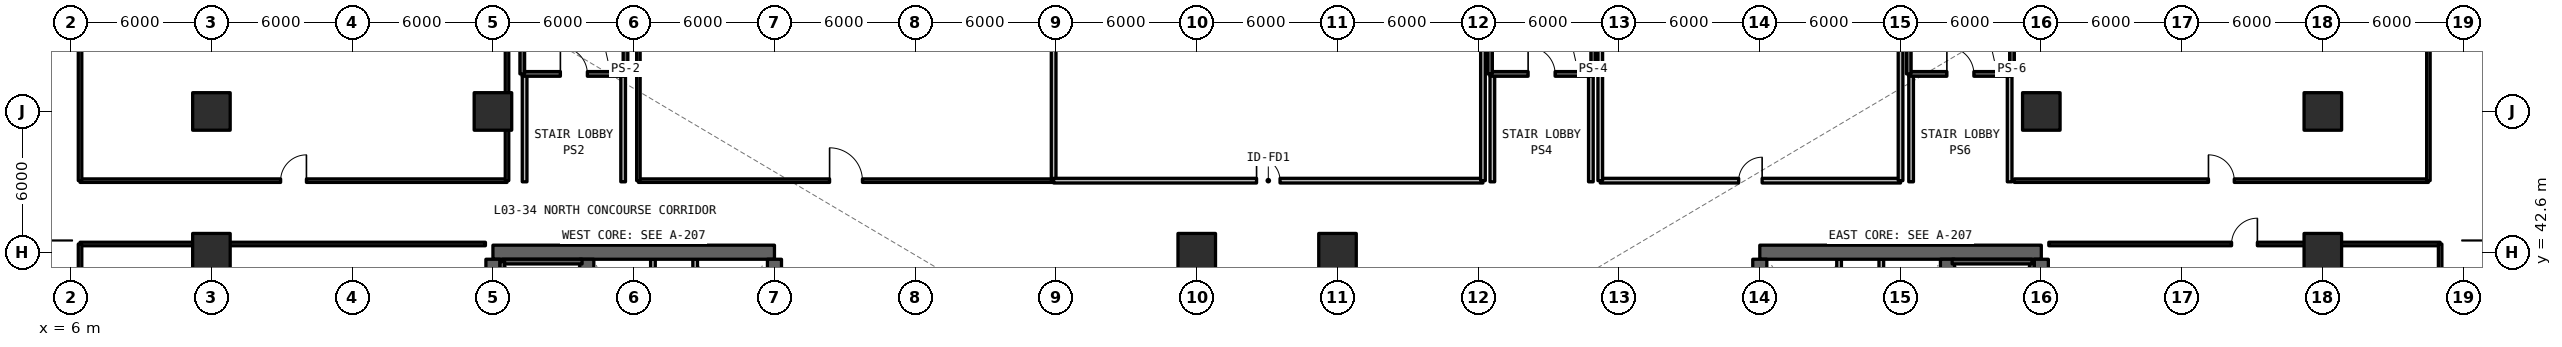
"""IFC4 building model, lengths in metres.
Left out: names, types, materials, properties, quantities, classifications, styles, units other than length and angle.
Written with IfcOpenShell. Run it as: python <this file> out.ifc"""

import sys

from ifc_helpers import new_model, si_unit, direction, frame, frame_2d, origin, origin_2d, place, context, subcontext, project, spatial, rectangle, extrude, element, fill, save


model = new_model("IFC4")
c1 = context("Model", 3, precision=1e-05, world=origin(), true_north=direction((0.0, 1.0)))
c2 = subcontext(c1, "Body", "Model", "MODEL_VIEW")
j1 = project(units=[si_unit("LENGTHUNIT", "METRE"), si_unit("PLANEANGLEUNIT", "RADIAN")], contexts=[c1])
p1 = place(None, origin())
s1 = spatial("IfcSite", under=j1, at=p1, CompositionType="ELEMENT")
p2 = place(p1, origin())
s2 = spatial("IfcBuilding", under=s1, at=p2, CompositionType="ELEMENT")
p3 = place(p2, frame((0.0, 0.0, 9.9)))
s3 = spatial("IfcBuildingStorey", under=s2, at=p3, CompositionType="ELEMENT", Elevation=9.9)
p4 = place(p3, frame((36.0, 42.6, 0.0), z_axis=(0.0, 0.0, 1.0), x_axis=(-1.0, 0.0, 0.0)))
e1 = element("IfcWall", 1, at=p4, inside=s3, PredefinedType="SHEAR", context=c2, shape_type="SweptSolid", body=[
    extrude(rectangle(XDim=12.0, YDim=0.6, at=frame_2d((6.0, 0.0))), origin(), (0.0, 0.0, 1.0), 4.95),
])
p5 = place(p3, frame((24.0, 24.9, 0.0), z_axis=(0.0, 0.0, 1.0), x_axis=(0.0, 1.0, 0.0)))
e2 = element("IfcWall", 2, at=p5, inside=s3, PredefinedType="SHEAR", context=c2, shape_type="SweptSolid", body=[
    extrude(rectangle(XDim=17.4, YDim=0.6, at=frame_2d((8.7, 0.0))), origin(), (0.0, 0.0, 1.0), 4.95),
])
p6 = place(p3, frame((36.0, 36.8, 0.0), z_axis=(0.0, 0.0, 1.0), x_axis=(0.0, 1.0, 0.0)))
e3 = element("IfcWall", 3, at=p6, inside=s3, PredefinedType="SHEAR", context=c2, shape_type="SweptSolid", body=[
    extrude(rectangle(XDim=5.5, YDim=0.6, at=frame_2d((2.75, 0.0))), origin(), (0.0, 0.0, 1.0), 4.95),
])
p7 = place(p3, frame((28.0, 24.9, 0.0), z_axis=(0.0, 0.0, 1.0), x_axis=(0.0, 1.0, 0.0)))
e4 = element("IfcWall", 4, at=p7, inside=s3, PredefinedType="SHEAR", context=c2, shape_type="SweptSolid", body=[
    extrude(rectangle(XDim=17.4, YDim=0.6, at=frame_2d((8.7, 0.0))), origin(), (0.0, 0.0, 1.0), 4.95),
])
p8 = place(p7, frame((0.35, 0.0, 0.0)))
e5 = element("IfcOpeningElement", 5, at=p8, cuts=e4, PredefinedType="OPENING", context=c2, shape_type="SweptSolid", body=[
    extrude(rectangle(XDim=1.15, YDim=2.15, at=frame_2d((0.575, 1.075))), frame((0.0, 0.31, 0.0), z_axis=(0.0, -1.0, 0.0), x_axis=(1.0, 0.0, 0.0)), (0.0, 0.0, 1.0), 0.62),
])
p9 = place(p7, frame((9.55, 0.0, 0.0)))
e6 = element("IfcOpeningElement", 6, at=p9, cuts=e4, PredefinedType="OPENING", context=c2, shape_type="SweptSolid", body=[
    extrude(rectangle(XDim=1.15, YDim=2.15, at=frame_2d((0.575, 1.075))), frame((0.0, 0.31, 0.0), z_axis=(0.0, -1.0, 0.0), x_axis=(1.0, 0.0, 0.0)), (0.0, 0.0, 1.0), 0.62),
])
p10 = place(p3, frame((90.0, 42.6, 0.0), z_axis=(0.0, 0.0, 1.0), x_axis=(-1.0, 0.0, 0.0)))
e7 = element("IfcWall", 7, at=p10, inside=s3, PredefinedType="SHEAR", context=c2, shape_type="SweptSolid", body=[
    extrude(rectangle(XDim=12.0, YDim=0.6, at=frame_2d((6.0, 0.0))), origin(), (0.0, 0.0, 1.0), 4.95),
])
p11 = place(p3, frame((90.0, 24.9, 0.0), z_axis=(0.0, 0.0, 1.0), x_axis=(0.0, 1.0, 0.0)))
e8 = element("IfcWall", 8, at=p11, inside=s3, PredefinedType="SHEAR", context=c2, shape_type="SweptSolid", body=[
    extrude(rectangle(XDim=17.4, YDim=0.6, at=frame_2d((8.7, 0.0))), origin(), (0.0, 0.0, 1.0), 4.95),
])
p12 = place(p3, frame((78.0, 36.8, 0.0), z_axis=(0.0, 0.0, 1.0), x_axis=(0.0, 1.0, 0.0)))
e9 = element("IfcWall", 9, at=p12, inside=s3, PredefinedType="SHEAR", context=c2, shape_type="SweptSolid", body=[
    extrude(rectangle(XDim=5.5, YDim=0.6, at=frame_2d((2.75, 0.0))), origin(), (0.0, 0.0, 1.0), 4.95),
])
p13 = place(p3, frame((86.0, 24.9, 0.0), z_axis=(0.0, 0.0, 1.0), x_axis=(0.0, 1.0, 0.0)))
e10 = element("IfcWall", 10, at=p13, inside=s3, PredefinedType="SHEAR", context=c2, shape_type="SweptSolid", body=[
    extrude(rectangle(XDim=17.4, YDim=0.6, at=frame_2d((8.7, 0.0))), origin(), (0.0, 0.0, 1.0), 4.95),
])
p14 = place(p13, frame((0.35, 0.0, 0.0)))
e11 = element("IfcOpeningElement", 11, at=p14, cuts=e10, PredefinedType="OPENING", context=c2, shape_type="SweptSolid", body=[
    extrude(rectangle(XDim=1.15, YDim=2.15, at=frame_2d((0.575, 1.075))), frame((0.0, 0.31, 0.0), z_axis=(0.0, -1.0, 0.0), x_axis=(1.0, 0.0, 0.0)), (0.0, 0.0, 1.0), 0.62),
])
p15 = place(p13, frame((9.55, 0.0, 0.0)))
e12 = element("IfcOpeningElement", 12, at=p15, cuts=e10, PredefinedType="OPENING", context=c2, shape_type="SweptSolid", body=[
    extrude(rectangle(XDim=1.15, YDim=2.15, at=frame_2d((0.575, 1.075))), frame((0.0, 0.31, 0.0), z_axis=(0.0, -1.0, 0.0), x_axis=(1.0, 0.0, 0.0)), (0.0, 0.0, 1.0), 0.62),
])
for number, where, z_axis, x_axis in (
    (13, (12.0, 42.6, 0.0), (0.0, 0.0, 1.0), (1.0, 0.0, 0.0)),
    (14, (54.0, 42.6, 0.0), (0.0, 0.0, 1.0), (1.0, 0.0, 0.0)),
    (15, (60.0, 42.6, 0.0), (0.0, 0.0, 1.0), (1.0, 0.0, 0.0)),
    (16, (102.0, 42.6, 0.0), (0.0, 0.0, 1.0), (1.0, 0.0, 0.0)),
    (17, (12.0, 48.6, 0.0), (0.0, 0.0, 1.0), (1.0, 0.0, 0.0)),
    (18, (24.0, 48.6, 0.0), (0.0, 0.0, 1.0), (1.0, 0.0, 0.0)),
    (19, (90.0, 48.6, 0.0), (0.0, 0.0, 1.0), (1.0, 0.0, 0.0)),
    (20, (102.0, 48.6, 0.0), (0.0, 0.0, 1.0), (1.0, 0.0, 0.0)),
):
    element("IfcColumn", number, at=place(p3, frame(where, z_axis=z_axis, x_axis=x_axis)), inside=s3, PredefinedType="COLUMN", context=c2, shape_type="SweptSolid", body=[
        extrude(rectangle(XDim=1.6, YDim=1.6, at=origin_2d()), origin(), (0.0, 0.0, 1.0), 4.95),
    ])
for number, where, z_axis, x_axis in (
    (21, (30.82, 36.88, 0.0), (0.0, 0.0, 1.0), (0.0, 1.0, 0.0)),
    (22, (32.62, 36.88, 0.0), (0.0, 0.0, 1.0), (0.0, 1.0, 0.0)),
    (23, (83.18, 36.88, 0.0), (0.0, 0.0, 1.0), (0.0, 1.0, 0.0)),
    (24, (81.38, 36.88, 0.0), (0.0, 0.0, 1.0), (0.0, 1.0, 0.0)),
):
    element("IfcWall", number, at=place(p3, frame(where, z_axis=z_axis, x_axis=x_axis)), inside=s3, PredefinedType="SOLIDWALL", context=c2, shape_type="SweptSolid", body=[
        extrude(rectangle(XDim=5.42, YDim=0.2, at=frame_2d((2.71, 0.0))), origin(), (0.0, 0.0, 1.0), 3.89),
    ])
for number, where, z_axis, x_axis in (
    (25, (25.35, 45.6, 0.0), (0.0, 0.0, 1.0), (0.0, 1.0, 0.0)),
    (26, (29.55, 45.6, 0.0), (0.0, 0.0, 1.0), (0.0, 1.0, 0.0)),
    (27, (66.6, 45.6, 0.0), (0.0, 0.0, 1.0), (0.0, 1.0, 0.0)),
    (28, (70.8, 45.6, 0.0), (0.0, 0.0, 1.0), (0.0, 1.0, 0.0)),
    (29, (84.45, 45.6, 0.0), (0.0, 0.0, 1.0), (0.0, 1.0, 0.0)),
    (30, (88.65, 45.6, 0.0), (0.0, 0.0, 1.0), (0.0, 1.0, 0.0)),
):
    element("IfcWall", number, at=place(p3, frame(where, z_axis=z_axis, x_axis=x_axis)), inside=s3, PredefinedType="SOLIDWALL", context=c2, shape_type="SweptSolid", body=[
        extrude(rectangle(XDim=4.6, YDim=0.2, at=frame_2d((2.3, 0.0))), origin(), (0.0, 0.0, 1.0), 3.89),
    ])
p16 = place(p3, frame((30.2, 45.65, 0.0), z_axis=(0.0, 0.0, 1.0), x_axis=(1.0, 0.0, 0.0)))
e31 = element("IfcWall", 31, at=p16, inside=s3, PredefinedType="SOLIDWALL", context=c2, shape_type="SweptSolid", body=[
    extrude(rectangle(XDim=17.7, YDim=0.15, at=frame_2d((8.85, 0.0))), origin(), (0.0, 0.0, 1.0), 3.89),
])
p17 = place(p16, frame((8.15, 0.0, 0.0)))
e32 = element("IfcOpeningElement", 32, at=p17, cuts=e31, PredefinedType="OPENING", context=c2, shape_type="SweptSolid", body=[
    extrude(rectangle(XDim=1.4, YDim=2.15, at=frame_2d((0.7, 1.075))), frame((0.0, 0.085, 0.0), z_axis=(0.0, -1.0, 0.0), x_axis=(1.0, 0.0, 0.0)), (0.0, 0.0, 1.0), 0.17),
])
p18 = place(p3, frame((30.2, 45.65, 0.0), z_axis=(0.0, 0.0, 1.0), x_axis=(0.0, 1.0, 0.0)))
e33 = element("IfcWall", 33, at=p18, inside=s3, PredefinedType="SOLIDWALL", context=c2, shape_type="SweptSolid", body=[
    extrude(rectangle(XDim=19.25, YDim=0.15, at=frame_2d((9.625, 0.0))), origin(), (0.0, 0.0, 1.0), 3.89),
])
p19 = place(p3, frame((47.9, 45.65, 0.0), z_axis=(0.0, 0.0, 1.0), x_axis=(0.0, 1.0, 0.0)))
e34 = element("IfcWall", 34, at=p19, inside=s3, PredefinedType="SOLIDWALL", context=c2, shape_type="SweptSolid", body=[
    extrude(rectangle(XDim=19.25, YDim=0.2, at=frame_2d((9.625, 0.0))), origin(), (0.0, 0.0, 1.0), 3.89),
])
p20 = place(p3, frame((47.9, 45.65, 0.0), z_axis=(0.0, 0.0, 1.0), x_axis=(1.0, 0.0, 0.0)))
e35 = element("IfcWall", 35, at=p20, inside=s3, PredefinedType="SOLIDWALL", context=c2, shape_type="SweptSolid", body=[
    extrude(rectangle(XDim=18.3, YDim=0.2, at=frame_2d((9.15, 0.0))), origin(), (0.0, 0.0, 1.0), 3.89),
])
p21 = place(p20, frame((8.65, 0.0, 0.0)))
e36 = element("IfcOpeningElement", 36, at=p21, cuts=e35, PredefinedType="OPENING", context=c2, shape_type="SweptSolid", body=[
    extrude(rectangle(XDim=1.0, YDim=2.15, at=frame_2d((0.5, 1.075))), frame((0.0, 0.11, 0.0), z_axis=(0.0, -1.0, 0.0), x_axis=(1.0, 0.0, 0.0)), (0.0, 0.0, 1.0), 0.22),
])
p22 = place(p3, frame((66.2, 45.65, 0.0), z_axis=(0.0, 0.0, 1.0), x_axis=(0.0, 1.0, 0.0)))
e37 = element("IfcWall", 37, at=p22, inside=s3, PredefinedType="SOLIDWALL", context=c2, shape_type="SweptSolid", body=[
    extrude(rectangle(XDim=19.25, YDim=0.2, at=frame_2d((9.625, 0.0))), origin(), (0.0, 0.0, 1.0), 3.89),
])
p23 = place(p3, frame((71.2, 45.65, 0.0), z_axis=(0.0, 0.0, 1.0), x_axis=(1.0, 0.0, 0.0)))
e38 = element("IfcWall", 38, at=p23, inside=s3, PredefinedType="SOLIDWALL", context=c2, shape_type="SweptSolid", body=[
    extrude(rectangle(XDim=12.8, YDim=0.2, at=frame_2d((6.4, 0.0))), origin(), (0.0, 0.0, 1.0), 3.89),
])
p24 = place(p23, frame((5.9, 0.0, 0.0)))
e39 = element("IfcOpeningElement", 39, at=p24, cuts=e38, PredefinedType="OPENING", context=c2, shape_type="SweptSolid", body=[
    extrude(rectangle(XDim=1.0, YDim=2.15, at=frame_2d((0.5, 1.075))), frame((0.0, 0.11, 0.0), z_axis=(0.0, -1.0, 0.0), x_axis=(1.0, 0.0, 0.0)), (0.0, 0.0, 1.0), 0.22),
])
for number, where, z_axis, x_axis in (
    (40, (71.2, 45.65, 0.0), (0.0, 0.0, 1.0), (0.0, 1.0, 0.0)),
    (41, (84.0, 45.65, 0.0), (0.0, 0.0, 1.0), (0.0, 1.0, 0.0)),
):
    element("IfcWall", number, at=place(p3, frame(where, z_axis=z_axis, x_axis=x_axis)), inside=s3, PredefinedType="SOLIDWALL", context=c2, shape_type="SweptSolid", body=[
        extrude(rectangle(XDim=19.25, YDim=0.2, at=frame_2d((9.625, 0.0))), origin(), (0.0, 0.0, 1.0), 3.89),
    ])
p25 = place(p3, frame((90.32, 42.95, 0.0), z_axis=(0.0, 0.0, 1.0), x_axis=(1.0, 0.0, 0.0)))
e42 = element("IfcWall", 42, at=p25, inside=s3, PredefinedType="SOLIDWALL", context=c2, shape_type="SweptSolid", body=[
    extrude(rectangle(XDim=16.68, YDim=0.15, at=frame_2d((8.34, 0.0))), origin(), (0.0, 0.0, 1.0), 3.89),
])
p26 = place(p25, frame((7.79, 0.0, 0.0)))
e43 = element("IfcOpeningElement", 43, at=p26, cuts=e42, PredefinedType="OPENING", context=c2, shape_type="SweptSolid", body=[
    extrude(rectangle(XDim=1.1, YDim=2.15, at=frame_2d((0.55, 1.075))), frame((0.0, 0.085, 0.0), z_axis=(0.0, -1.0, 0.0), x_axis=(1.0, 0.0, 0.0)), (0.0, 0.0, 1.0), 0.17),
])
p27 = place(p3, frame((107.0, 33.4, 0.0), z_axis=(0.0, 0.0, 1.0), x_axis=(0.0, 1.0, 0.0)))
e44 = element("IfcWall", 44, at=p27, inside=s3, PredefinedType="SOLIDWALL", context=c2, shape_type="SweptSolid", body=[
    extrude(rectangle(XDim=9.55, YDim=0.15, at=frame_2d((4.775, 0.0))), origin(), (0.0, 0.0, 1.0), 3.89),
])
p28 = place(p3, frame((6.4, 42.95, 0.0), z_axis=(0.0, 0.0, 1.0), x_axis=(1.0, 0.0, 0.0)))
e45 = element("IfcWall", 45, at=p28, inside=s3, PredefinedType="SOLIDWALL", context=c2, shape_type="SweptSolid", body=[
    extrude(rectangle(XDim=17.28, YDim=0.15, at=frame_2d((8.64, 0.0))), origin(), (0.0, 0.0, 1.0), 3.89),
])
p29 = place(p3, frame((6.4, 24.25, 0.0), z_axis=(0.0, 0.0, 1.0), x_axis=(0.0, 1.0, 0.0)))
e46 = element("IfcWall", 46, at=p29, inside=s3, PredefinedType="SOLIDWALL", context=c2, shape_type="SweptSolid", body=[
    extrude(rectangle(XDim=18.7, YDim=0.15, at=frame_2d((9.35, 0.0))), origin(), (0.0, 0.0, 1.0), 3.89),
])
p30 = place(p3, frame((6.4, 45.65, 0.0), z_axis=(0.0, 0.0, 1.0), x_axis=(1.0, 0.0, 0.0)))
e47 = element("IfcWall", 47, at=p30, inside=s3, PredefinedType="SOLIDWALL", context=c2, shape_type="SweptSolid", body=[
    extrude(rectangle(XDim=18.2, YDim=0.15, at=frame_2d((9.1, 0.0))), origin(), (0.0, 0.0, 1.0), 3.89),
])
p31 = place(p30, frame((8.55, 0.0, 0.0)))
e48 = element("IfcOpeningElement", 48, at=p31, cuts=e47, PredefinedType="OPENING", context=c2, shape_type="SweptSolid", body=[
    extrude(rectangle(XDim=1.1, YDim=2.15, at=frame_2d((0.55, 1.075))), frame((0.0, 0.085, 0.0), z_axis=(0.0, -1.0, 0.0), x_axis=(1.0, 0.0, 0.0)), (0.0, 0.0, 1.0), 0.17),
])
for number, where, z_axis, x_axis in (
    (49, (6.4, 45.65, 0.0), (0.0, 0.0, 1.0), (0.0, 1.0, 0.0)),
    (50, (24.6, 45.65, 0.0), (0.0, 0.0, 1.0), (0.0, 1.0, 0.0)),
):
    element("IfcWall", number, at=place(p3, frame(where, z_axis=z_axis, x_axis=x_axis)), inside=s3, PredefinedType="SOLIDWALL", context=c2, shape_type="SweptSolid", body=[
        extrude(rectangle(XDim=19.25, YDim=0.15, at=frame_2d((9.625, 0.0))), origin(), (0.0, 0.0, 1.0), 3.89),
    ])
p32 = place(p3, frame((88.85, 45.65, 0.0), z_axis=(0.0, 0.0, 1.0), x_axis=(1.0, 0.0, 0.0)))
e51 = element("IfcWall", 51, at=p32, inside=s3, PredefinedType="SOLIDWALL", context=c2, shape_type="SweptSolid", body=[
    extrude(rectangle(XDim=17.65, YDim=0.15, at=frame_2d((8.825, 0.0))), origin(), (0.0, 0.0, 1.0), 3.89),
])
p33 = place(p32, frame((8.275, 0.0, 0.0)))
e52 = element("IfcOpeningElement", 52, at=p33, cuts=e51, PredefinedType="OPENING", context=c2, shape_type="SweptSolid", body=[
    extrude(rectangle(XDim=1.1, YDim=2.15, at=frame_2d((0.55, 1.075))), frame((0.0, 0.085, 0.0), z_axis=(0.0, -1.0, 0.0), x_axis=(1.0, 0.0, 0.0)), (0.0, 0.0, 1.0), 0.17),
])
p34 = place(p3, frame((106.5, 45.65, 0.0), z_axis=(0.0, 0.0, 1.0), x_axis=(0.0, 1.0, 0.0)))
e53 = element("IfcWall", 53, at=p34, inside=s3, PredefinedType="SOLIDWALL", context=c2, shape_type="SweptSolid", body=[
    extrude(rectangle(XDim=19.25, YDim=0.15, at=frame_2d((9.625, 0.0))), origin(), (0.0, 0.0, 1.0), 3.89),
])
p35 = place(p3, frame((27.8, 42.2, 0.0), z_axis=(0.0, 0.0, 1.0), x_axis=(-1.0, 0.0, 0.0)))
e54 = element("IfcWall", 54, at=p35, inside=s3, PredefinedType="SOLIDWALL", context=c2, shape_type="SweptSolid", body=[
    extrude(rectangle(XDim=3.4, YDim=0.2, at=frame_2d((1.7, 0.0))), origin(), (0.0, 0.0, 1.0), 4.95),
])
for number, where, z_axis, x_axis in (
    (55, (24.4, 42.2, 0.0), (0.0, 0.0, 1.0), (0.0, -1.0, 0.0)),
    (56, (89.6, 34.2, 0.0), (0.0, 0.0, 1.0), (0.0, 1.0, 0.0)),
):
    element("IfcWall", number, at=place(p3, frame(where, z_axis=z_axis, x_axis=x_axis)), inside=s3, PredefinedType="SOLIDWALL", context=c2, shape_type="SweptSolid", body=[
        extrude(rectangle(XDim=8.0, YDim=0.2, at=frame_2d((4.0, 0.0))), origin(), (0.0, 0.0, 1.0), 4.95),
    ])
p36 = place(p3, frame((89.6, 42.2, 0.0), z_axis=(0.0, 0.0, 1.0), x_axis=(-1.0, 0.0, 0.0)))
e57 = element("IfcWall", 57, at=p36, inside=s3, PredefinedType="SOLIDWALL", context=c2, shape_type="SweptSolid", body=[
    extrude(rectangle(XDim=3.4, YDim=0.2, at=frame_2d((1.7, 0.0))), origin(), (0.0, 0.0, 1.0), 4.95),
])
p37 = place(p3, frame((25.25, 50.2, 0.0), z_axis=(0.0, 0.0, 1.0), x_axis=(1.0, 0.0, 0.0)))
e58 = element("IfcWall", 58, at=p37, inside=s3, PredefinedType="SOLIDWALL", context=c2, shape_type="SweptSolid", body=[
    extrude(rectangle(XDim=4.4, YDim=0.2, at=frame_2d((2.2, 0.0))), origin(), (0.0, 0.0, 1.0), 4.95),
])
p38 = place(p37, frame((1.625, 0.0, 0.0)))
e59 = element("IfcOpeningElement", 59, at=p38, cuts=e58, PredefinedType="OPENING", context=c2, shape_type="SweptSolid", body=[
    extrude(rectangle(XDim=1.15, YDim=2.15, at=frame_2d((0.575, 1.075))), frame((0.0, 0.11, 0.0), z_axis=(0.0, -1.0, 0.0), x_axis=(1.0, 0.0, 0.0)), (0.0, 0.0, 1.0), 0.22),
])
for number, where, z_axis, x_axis in (
    (60, (29.65, 50.2, 0.0), (0.0, 0.0, 1.0), (0.0, 1.0, 0.0)),
    (61, (25.25, 58.8, 0.0), (0.0, 0.0, 1.0), (0.0, -1.0, 0.0)),
):
    element("IfcWall", number, at=place(p3, frame(where, z_axis=z_axis, x_axis=x_axis)), inside=s3, PredefinedType="SOLIDWALL", context=c2, shape_type="SweptSolid", body=[
        extrude(rectangle(XDim=8.6, YDim=0.2, at=frame_2d((4.3, 0.0))), origin(), (0.0, 0.0, 1.0), 4.95),
    ])
p39 = place(p3, frame((66.5, 50.2, 0.0), z_axis=(0.0, 0.0, 1.0), x_axis=(1.0, 0.0, 0.0)))
e62 = element("IfcWall", 62, at=p39, inside=s3, PredefinedType="SOLIDWALL", context=c2, shape_type="SweptSolid", body=[
    extrude(rectangle(XDim=4.4, YDim=0.2, at=frame_2d((2.2, 0.0))), origin(), (0.0, 0.0, 1.0), 4.95),
])
p40 = place(p39, frame((1.625, 0.0, 0.0)))
e63 = element("IfcOpeningElement", 63, at=p40, cuts=e62, PredefinedType="OPENING", context=c2, shape_type="SweptSolid", body=[
    extrude(rectangle(XDim=1.15, YDim=2.15, at=frame_2d((0.575, 1.075))), frame((0.0, 0.11, 0.0), z_axis=(0.0, -1.0, 0.0), x_axis=(1.0, 0.0, 0.0)), (0.0, 0.0, 1.0), 0.22),
])
for number, where, z_axis, x_axis in (
    (64, (70.9, 50.2, 0.0), (0.0, 0.0, 1.0), (0.0, 1.0, 0.0)),
    (65, (66.5, 58.8, 0.0), (0.0, 0.0, 1.0), (0.0, -1.0, 0.0)),
):
    element("IfcWall", number, at=place(p3, frame(where, z_axis=z_axis, x_axis=x_axis)), inside=s3, PredefinedType="SOLIDWALL", context=c2, shape_type="SweptSolid", body=[
        extrude(rectangle(XDim=8.6, YDim=0.2, at=frame_2d((4.3, 0.0))), origin(), (0.0, 0.0, 1.0), 4.95),
    ])
p41 = place(p3, frame((84.35, 50.2, 0.0), z_axis=(0.0, 0.0, 1.0), x_axis=(1.0, 0.0, 0.0)))
e66 = element("IfcWall", 66, at=p41, inside=s3, PredefinedType="SOLIDWALL", context=c2, shape_type="SweptSolid", body=[
    extrude(rectangle(XDim=4.4, YDim=0.2, at=frame_2d((2.2, 0.0))), origin(), (0.0, 0.0, 1.0), 4.95),
])
p42 = place(p41, frame((1.625, 0.0, 0.0)))
e67 = element("IfcOpeningElement", 67, at=p42, cuts=e66, PredefinedType="OPENING", context=c2, shape_type="SweptSolid", body=[
    extrude(rectangle(XDim=1.15, YDim=2.15, at=frame_2d((0.575, 1.075))), frame((0.0, 0.11, 0.0), z_axis=(0.0, -1.0, 0.0), x_axis=(1.0, 0.0, 0.0)), (0.0, 0.0, 1.0), 0.22),
])
for number, where, z_axis, x_axis in (
    (68, (88.75, 50.2, 0.0), (0.0, 0.0, 1.0), (0.0, 1.0, 0.0)),
    (69, (84.35, 58.8, 0.0), (0.0, 0.0, 1.0), (0.0, -1.0, 0.0)),
):
    element("IfcWall", number, at=place(p3, frame(where, z_axis=z_axis, x_axis=x_axis)), inside=s3, PredefinedType="SOLIDWALL", context=c2, shape_type="SweptSolid", body=[
        extrude(rectangle(XDim=8.6, YDim=0.2, at=frame_2d((4.3, 0.0))), origin(), (0.0, 0.0, 1.0), 4.95),
    ])
p43 = place(p17, origin())
e70 = element("IfcDoor", 70, at=p43, inside=s3, OperationType="SINGLE_SWING_RIGHT", PredefinedType="DOOR", context=c2, shape_type="SweptSolid", body=[
    extrude(rectangle(XDim=1.4, YDim=2.15, at=frame_2d((0.7, 1.075))), frame((0.0, 0.025, 0.0), z_axis=(0.0, -1.0, 0.0), x_axis=(1.0, 0.0, 0.0)), (0.0, 0.0, 1.0), 0.05),
])
fill(e32, e70)
p44 = place(p21, origin())
e71 = element("IfcDoor", 71, at=p44, inside=s3, OperationType="SINGLE_SWING_LEFT", PredefinedType="DOOR", context=c2, shape_type="SweptSolid", body=[
    extrude(rectangle(XDim=1.0, YDim=2.15, at=frame_2d((0.5, 1.075))), frame((0.0, 0.025, 0.0), z_axis=(0.0, -1.0, 0.0), x_axis=(1.0, 0.0, 0.0)), (0.0, 0.0, 1.0), 0.05),
])
fill(e36, e71)
p45 = place(p24, origin())
e72 = element("IfcDoor", 72, at=p45, inside=s3, OperationType="SINGLE_SWING_RIGHT", PredefinedType="DOOR", context=c2, shape_type="SweptSolid", body=[
    extrude(rectangle(XDim=1.0, YDim=2.15, at=frame_2d((0.5, 1.075))), frame((0.0, 0.025, 0.0), z_axis=(0.0, -1.0, 0.0), x_axis=(1.0, 0.0, 0.0)), (0.0, 0.0, 1.0), 0.05),
])
fill(e39, e72)
p46 = place(p26, origin())
e73 = element("IfcDoor", 73, at=p46, inside=s3, OperationType="SINGLE_SWING_RIGHT", PredefinedType="DOOR", context=c2, shape_type="SweptSolid", body=[
    extrude(rectangle(XDim=1.1, YDim=2.15, at=frame_2d((0.55, 1.075))), frame((0.0, 0.025, 0.0), z_axis=(0.0, -1.0, 0.0), x_axis=(1.0, 0.0, 0.0)), (0.0, 0.0, 1.0), 0.05),
])
fill(e43, e73)
p47 = place(p31, origin())
e74 = element("IfcDoor", 74, at=p47, inside=s3, OperationType="SINGLE_SWING_RIGHT", PredefinedType="DOOR", context=c2, shape_type="SweptSolid", body=[
    extrude(rectangle(XDim=1.1, YDim=2.15, at=frame_2d((0.55, 1.075))), frame((0.0, 0.025, 0.0), z_axis=(0.0, -1.0, 0.0), x_axis=(1.0, 0.0, 0.0)), (0.0, 0.0, 1.0), 0.05),
])
fill(e48, e74)
p48 = place(p33, origin())
e75 = element("IfcDoor", 75, at=p48, inside=s3, OperationType="SINGLE_SWING_LEFT", PredefinedType="DOOR", context=c2, shape_type="SweptSolid", body=[
    extrude(rectangle(XDim=1.1, YDim=2.15, at=frame_2d((0.55, 1.075))), frame((0.0, 0.025, 0.0), z_axis=(0.0, -1.0, 0.0), x_axis=(1.0, 0.0, 0.0)), (0.0, 0.0, 1.0), 0.05),
])
fill(e52, e75)
p49 = place(p38, origin())
e76 = element("IfcDoor", 76, at=p49, inside=s3, OperationType="SINGLE_SWING_LEFT", PredefinedType="DOOR", context=c2, shape_type="SweptSolid", body=[
    extrude(rectangle(XDim=1.15, YDim=2.15, at=frame_2d((0.575, 1.075))), frame((0.0, 0.025, 0.0), z_axis=(0.0, -1.0, 0.0), x_axis=(1.0, 0.0, 0.0)), (0.0, 0.0, 1.0), 0.05),
])
fill(e59, e76)
p50 = place(p40, origin())
e77 = element("IfcDoor", 77, at=p50, inside=s3, OperationType="SINGLE_SWING_LEFT", PredefinedType="DOOR", context=c2, shape_type="SweptSolid", body=[
    extrude(rectangle(XDim=1.15, YDim=2.15, at=frame_2d((0.575, 1.075))), frame((0.0, 0.025, 0.0), z_axis=(0.0, -1.0, 0.0), x_axis=(1.0, 0.0, 0.0)), (0.0, 0.0, 1.0), 0.05),
])
fill(e63, e77)
p51 = place(p42, origin())
e78 = element("IfcDoor", 78, at=p51, inside=s3, OperationType="SINGLE_SWING_LEFT", PredefinedType="DOOR", context=c2, shape_type="SweptSolid", body=[
    extrude(rectangle(XDim=1.15, YDim=2.15, at=frame_2d((0.575, 1.075))), frame((0.0, 0.025, 0.0), z_axis=(0.0, -1.0, 0.0), x_axis=(1.0, 0.0, 0.0)), (0.0, 0.0, 1.0), 0.05),
])
fill(e67, e78)
save(model, sys.argv[1])
